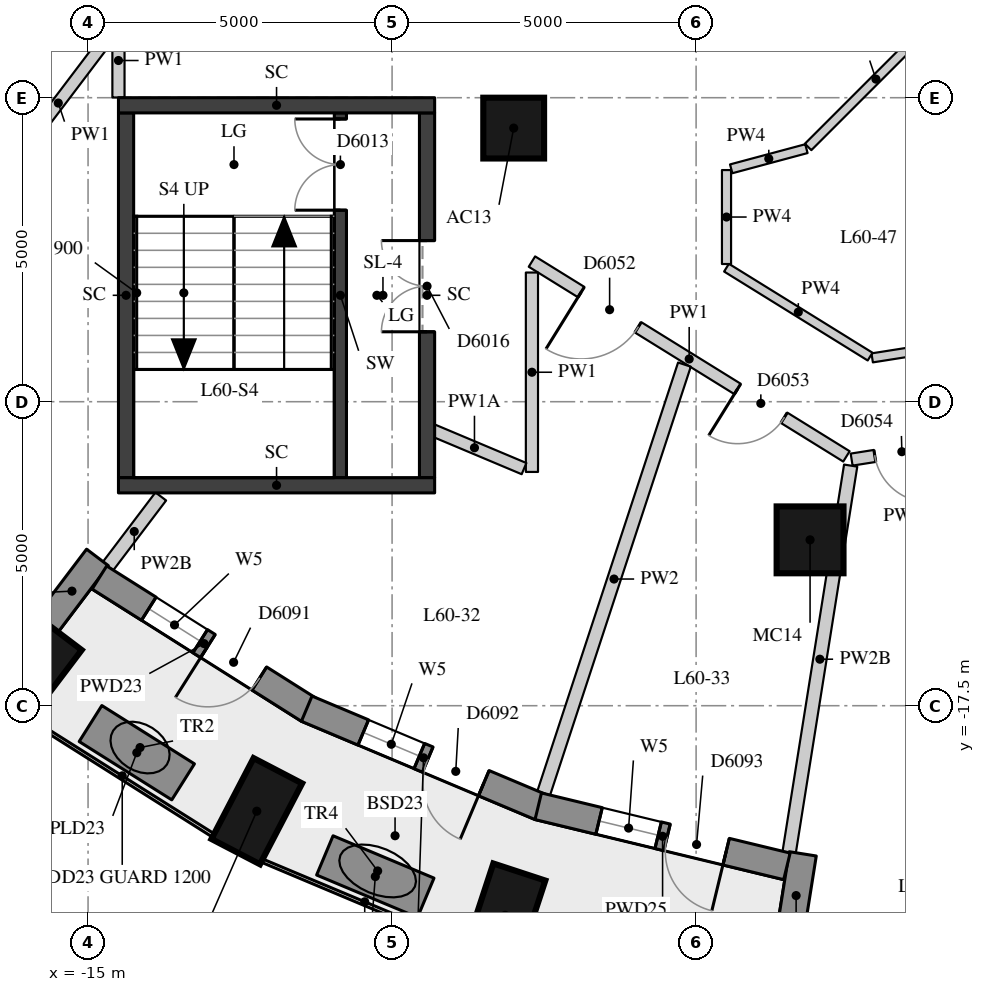
"""IFC4 building model, lengths in metres.
Left out: names, types, materials, properties, quantities, classifications, styles, units other than length and angle.
Written with IfcOpenShell. Run it as: python <this file> out.ifc"""

import sys

from ifc_helpers import new_model, si_unit, direction, frame, frame_2d, origin, origin_2d, place, context, subcontext, project, spatial, rectangle, extrude, element, fill, save


model = new_model("IFC4")
c1 = context("Model", 3, precision=1e-05, world=origin(), true_north=direction((0.0, 1.0)))
c2 = subcontext(c1, "Body", "Model", "MODEL_VIEW")
j1 = project(units=[si_unit("LENGTHUNIT", "METRE"), si_unit("PLANEANGLEUNIT", "RADIAN")], contexts=[c1])
p1 = place(None, origin())
s1 = spatial("IfcSite", under=j1, at=p1, CompositionType="ELEMENT")
p2 = place(p1, origin())
s2 = spatial("IfcBuilding", under=s1, at=p2, CompositionType="ELEMENT")
p3 = place(p2, frame((0.0, 0.0, 212.3)))
s3 = spatial("IfcBuildingStorey", under=s2, at=p3, CompositionType="ELEMENT", Elevation=212.3)
for number, where, z_axis, x_axis in (
    (1, (-15.916, -16.911, 0.0), (0.0, 0.0, 1.0), (-0.604, -0.797, 0.0)),
    (2, (-12.225, -19.235, 0.0), (0.0, 0.0, 1.0), (-0.462, -0.887, 0.0)),
    (3, (-8.141, -20.948, 0.0), (0.0, 0.0, 1.0), (-0.312, -0.95, 0.0)),
):
    element("IfcColumn", number, at=place(p3, frame(where, z_axis=z_axis, x_axis=x_axis)), inside=s3, PredefinedType="COLUMN", context=c2, shape_type="SweptSolid", body=[
        extrude(rectangle(XDim=1.5, YDim=0.9, at=origin_2d()), origin(), (0.0, 0.0, 1.0), 3.3),
    ])
p4 = place(p3, frame((-8.0, -8.0, 0.0), z_axis=(0.0, 0.0, 1.0), x_axis=(1.0, 0.0, 0.0)))
e4 = element("IfcColumn", 4, at=p4, inside=s3, PredefinedType="COLUMN", context=c2, shape_type="SweptSolid", body=[
    extrude(rectangle(XDim=1.0, YDim=1.0, at=origin_2d()), origin(), (0.0, 0.0, 1.0), 3.3),
])
p5 = place(p3, frame((-3.126, -14.772, 0.0), z_axis=(0.0, 0.0, 1.0), x_axis=(1.0, 0.0, 0.0)))
e5 = element("IfcColumn", 5, at=p5, inside=s3, PredefinedType="COLUMN", context=c2, shape_type="SweptSolid", body=[
    extrude(rectangle(XDim=1.1, YDim=1.1, at=origin_2d()), origin(), (0.0, 0.0, 1.0), 3.3),
])
p6 = place(p3, frame((-15.685, -16.17, 0.0), z_axis=(0.0, 0.0, 1.0), x_axis=(0.603644757989, 0.797253414011, 0.0)))
e6 = element("IfcWall", 6, at=p6, inside=s3, PredefinedType="SOLIDWALL", context=c2, shape_type="SweptSolid", body=[
    extrude(rectangle(XDim=1.391, YDim=0.45, at=frame_2d((0.695, 0.0))), origin(), (0.0, 0.0, 1.0), 2.57),
])
p7 = place(p3, frame((-3.464, -21.309, 0.0), z_axis=(0.0, 0.0, 1.0), x_axis=(0.157161757203, 0.98757287431, 0.0)))
e7 = element("IfcWall", 7, at=p7, inside=s3, PredefinedType="SOLIDWALL", context=c2, shape_type="SweptSolid", body=[
    extrude(rectangle(XDim=1.39, YDim=0.45, at=frame_2d((0.695, 0.0))), origin(), (0.0, 0.0, 1.0), 2.57),
])
p8 = place(p3, frame((-14.813, -15.392, 0.0), z_axis=(0.0, 0.0, 1.0), x_axis=(0.84545185308, -0.534051649303, 0.0)))
e8 = element("IfcWall", 8, at=p8, inside=s3, PredefinedType="SOLIDWALL", context=c2, shape_type="SweptSolid", body=[
    extrude(rectangle(XDim=4.071, YDim=0.45, at=frame_2d((2.036, 0.0))), origin(), (0.0, 0.0, 1.0), 3.02),
])
p9 = place(p8, frame((0.961, 0.0, 0.4)))
e9 = element("IfcOpeningElement", 9, at=p9, cuts=e8, PredefinedType="OPENING", context=c2, shape_type="SweptSolid", body=[
    extrude(rectangle(XDim=1.0, YDim=1.75, at=frame_2d((0.5, 0.875))), frame((0.0, 0.235, 0.0), z_axis=(0.0, -1.0, 0.0), x_axis=(1.0, 0.0, 0.0)), (0.0, 0.0, 1.0), 0.47),
])
p10 = place(p8, frame((2.111, 0.0, 0.0)))
e10 = element("IfcOpeningElement", 10, at=p10, cuts=e8, PredefinedType="OPENING", context=c2, shape_type="SweptSolid", body=[
    extrude(rectangle(XDim=1.0, YDim=2.15, at=frame_2d((0.5, 1.075))), frame((0.0, 0.235, 0.0), z_axis=(0.0, -1.0, 0.0), x_axis=(1.0, 0.0, 0.0)), (0.0, 0.0, 1.0), 0.47),
])
p11 = place(p3, frame((-11.404, -17.549, 0.0), z_axis=(0.0, 0.0, 1.0), x_axis=(0.921751093055, -0.387782055351, 0.0)))
e11 = element("IfcWall", 11, at=p11, inside=s3, PredefinedType="SOLIDWALL", context=c2, shape_type="SweptSolid", body=[
    extrude(rectangle(XDim=4.168, YDim=0.45, at=frame_2d((2.084, 0.0))), origin(), (0.0, 0.0, 1.0), 3.02),
])
p12 = place(p11, frame((1.009, 0.0, 0.4)))
e12 = element("IfcOpeningElement", 12, at=p12, cuts=e11, PredefinedType="OPENING", context=c2, shape_type="SweptSolid", body=[
    extrude(rectangle(XDim=1.0, YDim=1.75, at=frame_2d((0.5, 0.875))), frame((0.0, 0.235, 0.0), z_axis=(0.0, -1.0, 0.0), x_axis=(1.0, 0.0, 0.0)), (0.0, 0.0, 1.0), 0.47),
])
p13 = place(p11, frame((2.159, 0.0, 0.0)))
e13 = element("IfcOpeningElement", 13, at=p13, cuts=e11, PredefinedType="OPENING", context=c2, shape_type="SweptSolid", body=[
    extrude(rectangle(XDim=1.0, YDim=2.15, at=frame_2d((0.5, 1.075))), frame((0.0, 0.235, 0.0), z_axis=(0.0, -1.0, 0.0), x_axis=(1.0, 0.0, 0.0)), (0.0, 0.0, 1.0), 0.47),
])
p14 = place(p3, frame((-7.596, -19.154, 0.0), z_axis=(0.0, 0.0, 1.0), x_axis=(0.972004107579, -0.234963858602, 0.0)))
e14 = element("IfcWall", 14, at=p14, inside=s3, PredefinedType="SOLIDWALL", context=c2, shape_type="SweptSolid", body=[
    extrude(rectangle(XDim=4.207, YDim=0.45, at=frame_2d((2.104, 0.0))), origin(), (0.0, 0.0, 1.0), 3.02),
])
p15 = place(p14, frame((1.029, 0.0, 0.4)))
e15 = element("IfcOpeningElement", 15, at=p15, cuts=e14, PredefinedType="OPENING", context=c2, shape_type="SweptSolid", body=[
    extrude(rectangle(XDim=1.0, YDim=1.75, at=frame_2d((0.5, 0.875))), frame((0.0, 0.235, 0.0), z_axis=(0.0, -1.0, 0.0), x_axis=(1.0, 0.0, 0.0)), (0.0, 0.0, 1.0), 0.47),
])
p16 = place(p14, frame((2.179, 0.0, 0.0)))
e16 = element("IfcOpeningElement", 16, at=p16, cuts=e14, PredefinedType="OPENING", context=c2, shape_type="SweptSolid", body=[
    extrude(rectangle(XDim=1.0, YDim=2.15, at=frame_2d((0.5, 1.075))), frame((0.0, 0.235, 0.0), z_axis=(0.0, -1.0, 0.0), x_axis=(1.0, 0.0, 0.0)), (0.0, 0.0, 1.0), 0.47),
])
p17 = place(p3, frame((-14.96, -17.793, 0.0), z_axis=(0.0, 0.0, 1.0), x_axis=(0.846126379677, -0.532982316418, 0.0)))
e17 = element("IfcWall", 17, at=p17, inside=s3, PredefinedType="USERDEFINED", context=c2, shape_type="SweptSolid", body=[
    extrude(rectangle(XDim=1.8, YDim=0.7, at=frame_2d((0.9, 0.0))), origin(), (0.0, 0.0, 1.0), 0.75),
])
p18 = place(p3, frame((-11.106, -19.962, 0.0), z_axis=(0.0, 0.0, 1.0), x_axis=(0.922155368213, -0.386819695564, 0.0)))
e18 = element("IfcWall", 18, at=p18, inside=s3, PredefinedType="USERDEFINED", context=c2, shape_type="SweptSolid", body=[
    extrude(rectangle(XDim=1.8, YDim=0.7, at=frame_2d((0.9, 0.0))), origin(), (0.0, 0.0, 1.0), 0.75),
])
p19 = place(p3, frame((-10.85, -13.75, 0.0), z_axis=(0.0, 0.0, 1.0), x_axis=(0.0, 1.0, 0.0)))
e19 = element("IfcWall", 19, at=p19, inside=s3, PredefinedType="SHEAR", context=c2, shape_type="SweptSolid", body=[
    extrude(rectangle(XDim=6.0, YDim=0.2, at=frame_2d((3.0, 0.0))), origin(), (0.0, 0.0, 1.0), 3.02),
])
p20 = place(p19, frame((4.4, 0.0, 0.0)))
e20 = element("IfcOpeningElement", 20, at=p20, cuts=e19, PredefinedType="OPENING", context=c2, shape_type="SweptSolid", body=[
    extrude(rectangle(XDim=1.5, YDim=2.1, at=frame_2d((0.75, 1.05))), frame((0.0, 0.11, 0.0), z_axis=(0.0, -1.0, 0.0), x_axis=(1.0, 0.0, 0.0)), (0.0, 0.0, 1.0), 0.22),
])
p21 = place(p3, frame((-14.375, -13.75, -0.28), z_axis=(0.0, 0.0, 1.0), x_axis=(0.0, 1.0, 0.0)))
e21 = element("IfcWall", 21, at=p21, inside=s3, PredefinedType="SHEAR", context=c2, shape_type="SweptSolid", body=[
    extrude(rectangle(XDim=6.0, YDim=0.25, at=frame_2d((3.0, 0.0))), origin(), (0.0, 0.0, 1.0), 3.3),
])
p22 = place(p3, frame((-9.425, -13.75, -0.28), z_axis=(0.0, 0.0, 1.0), x_axis=(0.0, 1.0, 0.0)))
e22 = element("IfcWall", 22, at=p22, inside=s3, PredefinedType="SHEAR", context=c2, shape_type="SweptSolid", body=[
    extrude(rectangle(XDim=6.0, YDim=0.25, at=frame_2d((3.0, 0.0))), origin(), (0.0, 0.0, 1.0), 3.3),
])
p23 = place(p22, frame((2.4, 0.0, 0.28)))
e23 = element("IfcOpeningElement", 23, at=p23, cuts=e22, PredefinedType="OPENING", context=c2, shape_type="SweptSolid", body=[
    extrude(rectangle(XDim=1.5, YDim=2.1, at=frame_2d((0.75, 1.05))), frame((0.0, 0.135, 0.0), z_axis=(0.0, -1.0, 0.0), x_axis=(1.0, 0.0, 0.0)), (0.0, 0.0, 1.0), 0.27),
])
for number, where, z_axis, x_axis in (
    (24, (-14.5, -7.625, -0.28), (0.0, 0.0, 1.0), (1.0, 0.0, 0.0)),
    (25, (-14.5, -13.875, -0.28), (0.0, 0.0, 1.0), (1.0, 0.0, 0.0)),
):
    element("IfcWall", number, at=place(p3, frame(where, z_axis=z_axis, x_axis=x_axis)), inside=s3, PredefinedType="SHEAR", context=c2, shape_type="SweptSolid", body=[
        extrude(rectangle(XDim=5.2, YDim=0.25, at=frame_2d((2.6, 0.0))), origin(), (0.0, 0.0, 1.0), 3.3),
    ])
p24 = place(p3, frame((9.306, -11.603, 0.0), z_axis=(0.0, 0.0, 1.0), x_axis=(-0.987842562114, -0.155457622769, 0.0)))
e26 = element("IfcWall", 26, at=p24, inside=s3, PredefinedType="PARTITIONING", context=c2, shape_type="SweptSolid", body=[
    extrude(rectangle(XDim=11.893, YDim=0.2, at=frame_2d((5.947, 0.0))), origin(), (0.0, 0.0, 1.0), 3.02),
])
p25 = place(p24, frame((10.607, 0.0, 0.0)))
e27 = element("IfcOpeningElement", 27, at=p25, cuts=e26, PredefinedType="OPENING", context=c2, shape_type="SweptSolid", body=[
    extrude(rectangle(XDim=0.9, YDim=2.1, at=frame_2d((0.45, 1.05))), frame((0.0, 0.11, 0.0), z_axis=(0.0, -1.0, 0.0), x_axis=(1.0, 0.0, 0.0)), (0.0, 0.0, 1.0), 0.22),
])
p26 = place(p24, frame((5.829, 0.0, 0.0)))
e28 = element("IfcOpeningElement", 28, at=p26, cuts=e26, PredefinedType="OPENING", context=c2, shape_type="SweptSolid", body=[
    extrude(rectangle(XDim=0.9, YDim=2.1, at=frame_2d((0.45, 1.05))), frame((0.0, 0.11, 0.0), z_axis=(0.0, -1.0, 0.0), x_axis=(1.0, 0.0, 0.0)), (0.0, 0.0, 1.0), 0.22),
])
p27 = place(p24, frame((4.669, 0.0, 0.0)))
e29 = element("IfcOpeningElement", 29, at=p27, cuts=e26, PredefinedType="OPENING", context=c2, shape_type="SweptSolid", body=[
    extrude(rectangle(XDim=0.9, YDim=2.1, at=frame_2d((0.45, 1.05))), frame((0.0, 0.11, 0.0), z_axis=(0.0, -1.0, 0.0), x_axis=(1.0, 0.0, 0.0)), (0.0, 0.0, 1.0), 0.22),
])
p28 = place(p24, frame((0.14, 0.0, 0.0)))
e30 = element("IfcOpeningElement", 30, at=p28, cuts=e26, PredefinedType="OPENING", context=c2, shape_type="SweptSolid", body=[
    extrude(rectangle(XDim=1.1, YDim=2.1, at=frame_2d((0.55, 1.05))), frame((0.0, 0.11, 0.0), z_axis=(0.0, -1.0, 0.0), x_axis=(1.0, 0.0, 0.0)), (0.0, 0.0, 1.0), 0.22),
])
p29 = place(p3, frame((-2.528, -13.4, 0.0), z_axis=(0.0, 0.0, 1.0), x_axis=(-0.850088088191, 0.526640524757, 0.0)))
e31 = element("IfcWall", 31, at=p29, inside=s3, PredefinedType="PARTITIONING", context=c2, shape_type="SweptSolid", body=[
    extrude(rectangle(XDim=6.084, YDim=0.2, at=frame_2d((3.042, 0.0))), origin(), (0.0, 0.0, 1.0), 3.02),
])
p30 = place(p29, frame((4.031, 0.0, 0.0)))
e32 = element("IfcOpeningElement", 32, at=p30, cuts=e31, PredefinedType="OPENING", context=c2, shape_type="SweptSolid", body=[
    extrude(rectangle(XDim=1.1, YDim=2.1, at=frame_2d((0.55, 1.05))), frame((0.0, 0.11, 0.0), z_axis=(0.0, -1.0, 0.0), x_axis=(1.0, 0.0, 0.0)), (0.0, 0.0, 1.0), 0.22),
])
p31 = place(p29, frame((1.206, 0.0, 0.0)))
e33 = element("IfcOpeningElement", 33, at=p31, cuts=e31, PredefinedType="OPENING", context=c2, shape_type="SweptSolid", body=[
    extrude(rectangle(XDim=0.9, YDim=2.1, at=frame_2d((0.45, 1.05))), frame((0.0, 0.11, 0.0), z_axis=(0.0, -1.0, 0.0), x_axis=(1.0, 0.0, 0.0)), (0.0, 0.0, 1.0), 0.22),
])
p32 = place(p3, frame((-7.7, -10.375, 0.0), z_axis=(0.0, 0.0, 1.0), x_axis=(0.0, -1.0, 0.0)))
e34 = element("IfcWall", 34, at=p32, inside=s3, PredefinedType="PARTITIONING", context=c2, shape_type="SweptSolid", body=[
    extrude(rectangle(XDim=3.28, YDim=0.2, at=frame_2d((1.64, 0.0))), origin(), (0.0, 0.0, 1.0), 3.02),
])
p33 = place(p3, frame((-7.83, -13.601, 0.0), z_axis=(0.0, 0.0, 1.0), x_axis=(-0.921793770535, 0.387680596112, 0.0)))
e35 = element("IfcWall", 35, at=p33, inside=s3, PredefinedType="PARTITIONING", context=c2, shape_type="SweptSolid", body=[
    extrude(rectangle(XDim=1.769, YDim=0.2, at=frame_2d((0.885, 0.0))), origin(), (0.0, 0.0, 1.0), 2.57),
])
p34 = place(p3, frame((-14.5, -7.496, 0.0), z_axis=(0.0, 0.0, 1.0), x_axis=(0.0, 1.0, 0.0)))
e36 = element("IfcWall", 36, at=p34, inside=s3, PredefinedType="PARTITIONING", context=c2, shape_type="SweptSolid", body=[
    extrude(rectangle(XDim=1.216, YDim=0.2, at=frame_2d((0.608, 0.0))), origin(), (0.0, 0.0, 1.0), 3.02),
])
p35 = place(p3, frame((-14.679, -6.518, 0.0), z_axis=(0.0, 0.0, 1.0), x_axis=(-0.603820908912, -0.797120009761, 0.0)))
e37 = element("IfcWall", 37, at=p35, inside=s3, PredefinedType="PARTITIONING", context=c2, shape_type="SweptSolid", body=[
    extrude(rectangle(XDim=2.684, YDim=0.2, at=frame_2d((1.342, 0.0))), origin(), (0.0, 0.0, 1.0), 3.02),
])
p36 = place(p3, frame((0.921, -11.303, 0.0), z_axis=(0.0, 0.0, 1.0), x_axis=(-0.987854584084, -0.15538121091, 0.0)))
e38 = element("IfcWall", 38, at=p36, inside=s3, PredefinedType="PARTITIONING", context=c2, shape_type="SweptSolid", body=[
    extrude(rectangle(XDim=3.062, YDim=0.15, at=frame_2d((1.531, 0.0))), origin(), (0.0, 0.0, 1.0), 3.02),
])
p37 = place(p3, frame((-2.138, -11.758, 0.0), z_axis=(0.0, 0.0, 1.0), x_axis=(-0.850109654363, 0.526605711666, 0.0)))
e39 = element("IfcWall", 39, at=p37, inside=s3, PredefinedType="PARTITIONING", context=c2, shape_type="SweptSolid", body=[
    extrude(rectangle(XDim=2.778, YDim=0.15, at=frame_2d((1.389, 0.0))), origin(), (0.0, 0.0, 1.0), 3.02),
])
p38 = place(p3, frame((-4.5, -10.235, 0.0), z_axis=(0.0, 0.0, 1.0), x_axis=(0.0, 1.0, 0.0)))
e40 = element("IfcWall", 40, at=p38, inside=s3, PredefinedType="PARTITIONING", context=c2, shape_type="SweptSolid", body=[
    extrude(rectangle(XDim=1.545, YDim=0.15, at=frame_2d((0.772, 0.0))), origin(), (0.0, 0.0, 1.0), 3.02),
])
p39 = place(p3, frame((-4.423, -8.67, 0.0), z_axis=(0.0, 0.0, 1.0), x_axis=(0.965898680525, 0.258920333232, 0.0)))
e41 = element("IfcWall", 41, at=p39, inside=s3, PredefinedType="PARTITIONING", context=c2, shape_type="SweptSolid", body=[
    extrude(rectangle(XDim=1.281, YDim=0.15, at=frame_2d((0.64, 0.0))), origin(), (0.0, 0.0, 1.0), 3.02),
])
p40 = place(p3, frame((-3.158, -8.31, 0.0), z_axis=(0.0, 0.0, 1.0), x_axis=(0.707106781187, 0.707106781187, 0.0)))
e42 = element("IfcWall", 42, at=p40, inside=s3, PredefinedType="PARTITIONING", context=c2, shape_type="SweptSolid", body=[
    extrude(rectangle(XDim=3.154, YDim=0.15, at=frame_2d((1.577, 0.0))), origin(), (0.0, 0.0, 1.0), 3.02),
])
p41 = place(p3, frame((-22.896, -6.771, 0.0), z_axis=(0.0, 0.0, 1.0), x_axis=(0.92738233242, 0.374114968313, 0.0)))
e43 = element("IfcWall", 43, at=p41, inside=s3, PredefinedType="PARTITIONING", context=c2, shape_type="SweptSolid", body=[
    extrude(rectangle(XDim=8.246, YDim=0.22, at=frame_2d((4.123, 0.0))), origin(), (0.0, 0.0, 1.0), 3.02),
])
p42 = place(p3, frame((-14.677, -15.211, 0.0), z_axis=(0.0, 0.0, 1.0), x_axis=(0.603665965776, 0.797237355976, 0.0)))
e44 = element("IfcWall", 44, at=p42, inside=s3, PredefinedType="PARTITIONING", context=c2, shape_type="SweptSolid", body=[
    extrude(rectangle(XDim=1.447, YDim=0.22, at=frame_2d((0.723, 0.0))), origin(), (0.0, 0.0, 1.0), 2.57),
])
p43 = place(p3, frame((-7.508, -18.944, 0.0), z_axis=(0.0, 0.0, 1.0), x_axis=(0.311962912662, 0.950094280124, 0.0)))
e45 = element("IfcWall", 45, at=p43, inside=s3, PredefinedType="PARTITIONING", context=c2, shape_type="SweptSolid", body=[
    extrude(rectangle(XDim=7.425, YDim=0.22, at=frame_2d((3.712, 0.0))), origin(), (0.0, 0.0, 1.0), 3.02),
])
p44 = place(p3, frame((-3.471, -19.919, 0.0), z_axis=(0.0, 0.0, 1.0), x_axis=(0.157082319053, 0.987585512774, 0.0)))
e46 = element("IfcWall", 46, at=p44, inside=s3, PredefinedType="PARTITIONING", context=c2, shape_type="SweptSolid", body=[
    extrude(rectangle(XDim=6.448, YDim=0.22, at=frame_2d((3.224, 0.0))), origin(), (0.0, 0.0, 1.0), 2.57),
])
p45 = place(p9, origin())
e47 = element("IfcWindow", 47, at=p45, inside=s3, PartitioningType="SINGLE_PANEL", PredefinedType="WINDOW", context=c2, shape_type="SweptSolid", body=[
    extrude(rectangle(XDim=1.0, YDim=1.75, at=frame_2d((0.5, 0.875))), frame((0.0, 0.035, 0.0), z_axis=(0.0, -1.0, 0.0), x_axis=(1.0, 0.0, 0.0)), (0.0, 0.0, 1.0), 0.06),
])
fill(e9, e47)
p46 = place(p10, frame((1.0, 0.0, 0.0), z_axis=(0.0, 0.0, 1.0), x_axis=(-1.0, 0.0, 0.0)))
e48 = element("IfcDoor", 48, at=p46, inside=s3, OperationType="SINGLE_SWING_RIGHT", PredefinedType="DOOR", context=c2, shape_type="SweptSolid", body=[
    extrude(rectangle(XDim=1.0, YDim=2.15, at=frame_2d((0.5, 1.075))), frame((0.0, 0.075, 0.0), z_axis=(0.0, -1.0, 0.0), x_axis=(1.0, 0.0, 0.0)), (0.0, 0.0, 1.0), 0.05),
])
fill(e10, e48)
p47 = place(p12, origin())
e49 = element("IfcWindow", 49, at=p47, inside=s3, PartitioningType="SINGLE_PANEL", PredefinedType="WINDOW", context=c2, shape_type="SweptSolid", body=[
    extrude(rectangle(XDim=1.0, YDim=1.75, at=frame_2d((0.5, 0.875))), frame((0.0, 0.035, 0.0), z_axis=(0.0, -1.0, 0.0), x_axis=(1.0, 0.0, 0.0)), (0.0, 0.0, 1.0), 0.06),
])
fill(e12, e49)
p48 = place(p13, frame((1.0, 0.0, 0.0), z_axis=(0.0, 0.0, 1.0), x_axis=(-1.0, 0.0, 0.0)))
e50 = element("IfcDoor", 50, at=p48, inside=s3, OperationType="SINGLE_SWING_LEFT", PredefinedType="DOOR", context=c2, shape_type="SweptSolid", body=[
    extrude(rectangle(XDim=1.0, YDim=2.15, at=frame_2d((0.5, 1.075))), frame((0.0, 0.075, 0.0), z_axis=(0.0, -1.0, 0.0), x_axis=(1.0, 0.0, 0.0)), (0.0, 0.0, 1.0), 0.05),
])
fill(e13, e50)
p49 = place(p15, origin())
e51 = element("IfcWindow", 51, at=p49, inside=s3, PartitioningType="SINGLE_PANEL", PredefinedType="WINDOW", context=c2, shape_type="SweptSolid", body=[
    extrude(rectangle(XDim=1.0, YDim=1.75, at=frame_2d((0.5, 0.875))), frame((0.0, 0.035, 0.0), z_axis=(0.0, -1.0, 0.0), x_axis=(1.0, 0.0, 0.0)), (0.0, 0.0, 1.0), 0.06),
])
fill(e15, e51)
p50 = place(p16, frame((1.0, 0.0, 0.0), z_axis=(0.0, 0.0, 1.0), x_axis=(-1.0, 0.0, 0.0)))
e52 = element("IfcDoor", 52, at=p50, inside=s3, OperationType="SINGLE_SWING_LEFT", PredefinedType="DOOR", context=c2, shape_type="SweptSolid", body=[
    extrude(rectangle(XDim=1.0, YDim=2.15, at=frame_2d((0.5, 1.075))), frame((0.0, 0.075, 0.0), z_axis=(0.0, -1.0, 0.0), x_axis=(1.0, 0.0, 0.0)), (0.0, 0.0, 1.0), 0.05),
])
fill(e16, e52)
p51 = place(p20, origin())
e53 = element("IfcDoor", 53, at=p51, inside=s3, OperationType="DOUBLE_DOOR_SINGLE_SWING", PredefinedType="DOOR", context=c2, shape_type="SweptSolid", body=[
    extrude(rectangle(XDim=1.5, YDim=2.1, at=frame_2d((0.75, 1.05))), frame((0.0, 0.025, 0.0), z_axis=(0.0, -1.0, 0.0), x_axis=(1.0, 0.0, 0.0)), (0.0, 0.0, 1.0), 0.05),
])
fill(e20, e53)
p52 = place(p23, origin())
e54 = element("IfcDoor", 54, at=p52, inside=s3, OperationType="DOUBLE_DOOR_SINGLE_SWING", PredefinedType="DOOR", context=c2, shape_type="SweptSolid", body=[
    extrude(rectangle(XDim=1.5, YDim=2.1, at=frame_2d((0.75, 1.05))), frame((0.0, 0.025, 0.0), z_axis=(0.0, -1.0, 0.0), x_axis=(1.0, 0.0, 0.0)), (0.0, 0.0, 1.0), 0.05),
])
fill(e23, e54)
p53 = place(p30, origin())
e55 = element("IfcDoor", 55, at=p53, inside=s3, OperationType="SINGLE_SWING_RIGHT", PredefinedType="DOOR", context=c2, shape_type="SweptSolid", body=[
    extrude(rectangle(XDim=1.1, YDim=2.1, at=frame_2d((0.55, 1.05))), frame((0.0, 0.025, 0.0), z_axis=(0.0, -1.0, 0.0), x_axis=(1.0, 0.0, 0.0)), (0.0, 0.0, 1.0), 0.05),
])
fill(e32, e55)
p54 = place(p31, origin())
e56 = element("IfcDoor", 56, at=p54, inside=s3, OperationType="SINGLE_SWING_RIGHT", PredefinedType="DOOR", context=c2, shape_type="SweptSolid", body=[
    extrude(rectangle(XDim=0.9, YDim=2.1, at=frame_2d((0.45, 1.05))), frame((0.0, 0.025, 0.0), z_axis=(0.0, -1.0, 0.0), x_axis=(1.0, 0.0, 0.0)), (0.0, 0.0, 1.0), 0.05),
])
fill(e33, e56)
p55 = place(p25, origin())
e57 = element("IfcDoor", 57, at=p55, inside=s3, OperationType="SINGLE_SWING_LEFT", PredefinedType="DOOR", context=c2, shape_type="SweptSolid", body=[
    extrude(rectangle(XDim=0.9, YDim=2.1, at=frame_2d((0.45, 1.05))), frame((0.0, 0.025, 0.0), z_axis=(0.0, -1.0, 0.0), x_axis=(1.0, 0.0, 0.0)), (0.0, 0.0, 1.0), 0.05),
])
fill(e27, e57)
save(model, sys.argv[1])
